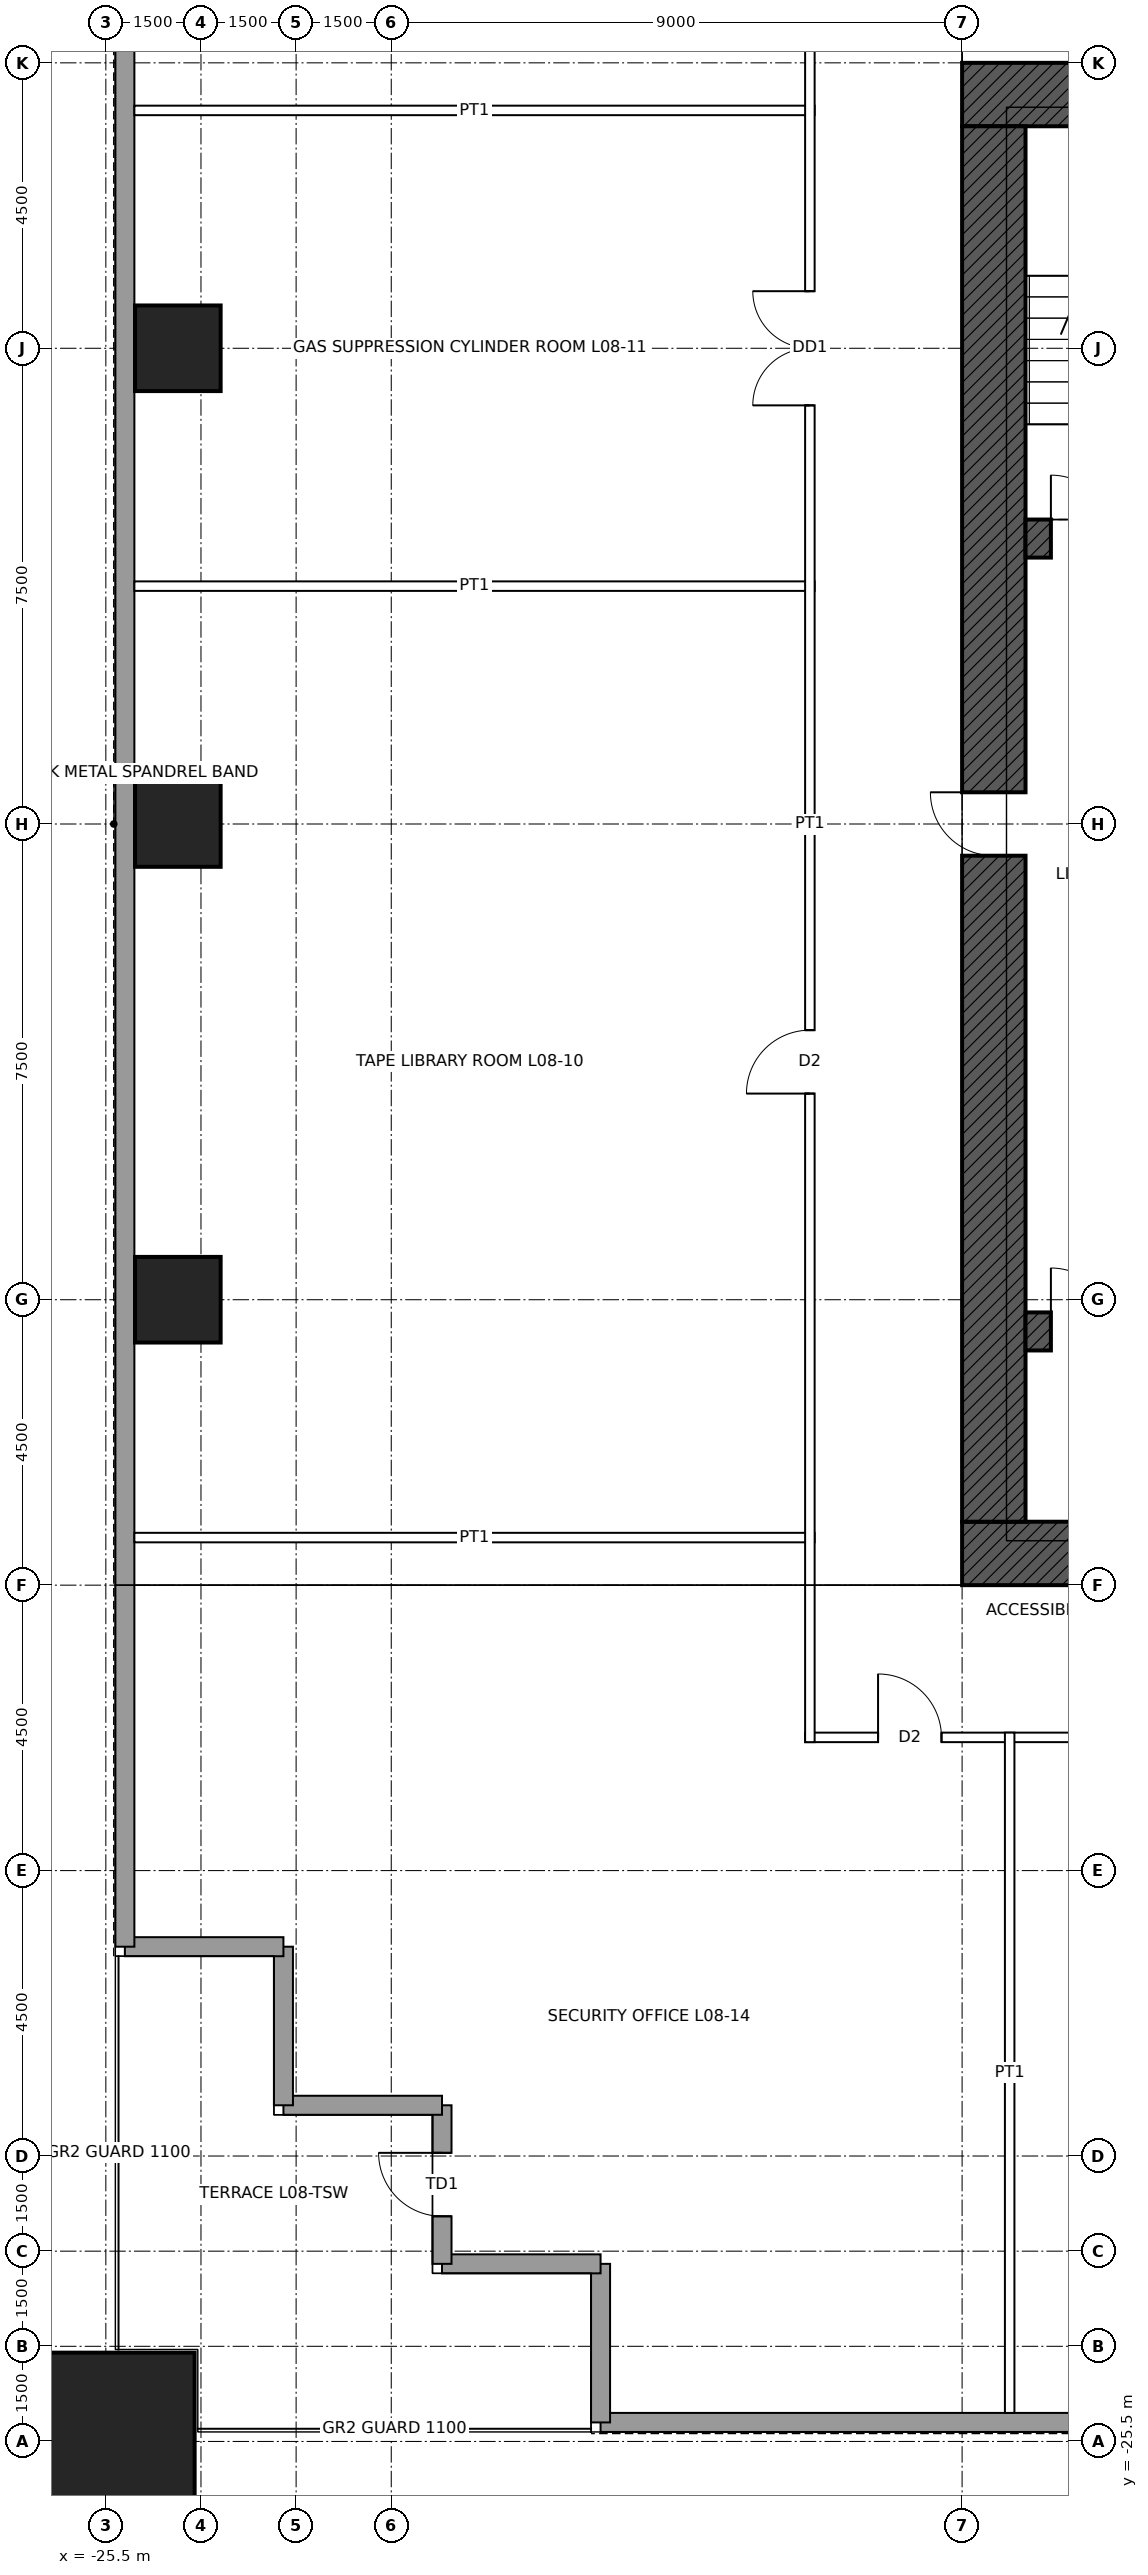
"""IFC4 building model, lengths in metres.
Left out: names, types, materials, properties, quantities, classifications, styles, units other than length and angle.
Written with IfcOpenShell. Run it as: python <this file> out.ifc"""

import sys

from ifc_helpers import new_model, si_unit, direction, frame, frame_2d, origin, origin_2d, place, context, subcontext, project, spatial, rectangle, hollow_rectangle, extrude, element, fill, save


model = new_model("IFC4")
c1 = context("Model", 3, precision=1e-05, world=origin(), true_north=direction((0.0, 1.0)))
c2 = subcontext(c1, "Body", "Model", "MODEL_VIEW")
j1 = project(units=[si_unit("LENGTHUNIT", "METRE"), si_unit("PLANEANGLEUNIT", "RADIAN")], contexts=[c1])
p1 = place(None, origin())
s1 = spatial("IfcSite", under=j1, at=p1, CompositionType="ELEMENT")
p2 = place(p1, origin())
s2 = spatial("IfcBuilding", under=s1, at=p2, CompositionType="ELEMENT")
p3 = place(p2, frame((0.0, 0.0, 43.4)))
s3 = spatial("IfcBuildingStorey", under=s2, at=p3, CompositionType="ELEMENT", Elevation=43.4)
p4 = place(p3, frame((-25.5, -25.5, 0.0), z_axis=(0.0, 0.0, 1.0), x_axis=(1.0, 0.0, 0.0)))
e1 = element("IfcColumn", 1, at=p4, inside=s3, PredefinedType="COLUMN", context=c2, shape_type="SweptSolid", body=[
    extrude(hollow_rectangle(XDim=2.8, YDim=2.8, WallThickness=0.14, at=origin_2d()), origin(), (0.0, 0.0, 1.0), 5.0),
])
for number, where, z_axis, x_axis in (
    (2, (-24.365, -7.5, 0.0), (0.0, 0.0, 1.0), (1.0, 0.0, 0.0)),
    (3, (-24.365, 0.0, 0.0), (0.0, 0.0, 1.0), (1.0, 0.0, 0.0)),
    (4, (-24.365, 7.5, 0.0), (0.0, 0.0, 1.0), (1.0, 0.0, 0.0)),
):
    element("IfcColumn", number, at=place(p3, frame(where, z_axis=z_axis, x_axis=x_axis)), inside=s3, PredefinedType="COLUMN", context=c2, shape_type="SweptSolid", body=[
        extrude(hollow_rectangle(XDim=1.35, YDim=1.35, WallThickness=0.085, at=origin_2d()), origin(), (0.0, 0.0, 1.0), 5.0),
    ])
p5 = place(p3, frame((-12.0, 11.5, 0.0), z_axis=(0.0, 0.0, 1.0), x_axis=(1.0, 0.0, 0.0)))
e5 = element("IfcWall", 5, at=p5, inside=s3, PredefinedType="SHEAR", context=c2, shape_type="SweptSolid", body=[
    extrude(rectangle(XDim=24.0, YDim=1.0, at=frame_2d((12.0, 0.0))), origin(), (0.0, 0.0, 1.0), 5.0),
])
p6 = place(p5, frame((6.25, 0.0, 0.0)))
e6 = element("IfcOpeningElement", 6, at=p6, cuts=e5, PredefinedType="OPENING", context=c2, shape_type="SweptSolid", body=[
    extrude(rectangle(XDim=1.0, YDim=2.4, at=frame_2d((0.5, 1.2))), frame((0.0, 0.51, 0.0), z_axis=(0.0, -1.0, 0.0), x_axis=(1.0, 0.0, 0.0)), (0.0, 0.0, 1.0), 1.02),
])
p7 = place(p5, frame((16.75, 0.0, 0.0)))
e7 = element("IfcOpeningElement", 7, at=p7, cuts=e5, PredefinedType="OPENING", context=c2, shape_type="SweptSolid", body=[
    extrude(rectangle(XDim=1.0, YDim=2.4, at=frame_2d((0.5, 1.2))), frame((0.0, 0.51, 0.0), z_axis=(0.0, -1.0, 0.0), x_axis=(1.0, 0.0, 0.0)), (0.0, 0.0, 1.0), 1.02),
])
p8 = place(p3, frame((12.0, -11.5, 0.0), z_axis=(0.0, 0.0, 1.0), x_axis=(-1.0, 0.0, 0.0)))
e8 = element("IfcWall", 8, at=p8, inside=s3, PredefinedType="SHEAR", context=c2, shape_type="SweptSolid", body=[
    extrude(rectangle(XDim=24.0, YDim=1.0, at=frame_2d((12.0, 0.0))), origin(), (0.0, 0.0, 1.0), 5.0),
])
p9 = place(p8, frame((11.5, 0.0, 0.0)))
e9 = element("IfcOpeningElement", 9, at=p9, cuts=e8, PredefinedType="OPENING", context=c2, shape_type="SweptSolid", body=[
    extrude(rectangle(XDim=1.0, YDim=2.1, at=frame_2d((0.5, 1.05))), frame((0.0, 0.51, 0.0), z_axis=(0.0, -1.0, 0.0), x_axis=(1.0, 0.0, 0.0)), (0.0, 0.0, 1.0), 1.02),
])
p10 = place(p8, frame((1.0, 0.0, 0.0)))
e10 = element("IfcOpeningElement", 10, at=p10, cuts=e8, PredefinedType="OPENING", context=c2, shape_type="SweptSolid", body=[
    extrude(rectangle(XDim=1.0, YDim=2.4, at=frame_2d((0.5, 1.2))), frame((0.0, 0.51, 0.0), z_axis=(0.0, -1.0, 0.0), x_axis=(1.0, 0.0, 0.0)), (0.0, 0.0, 1.0), 1.02),
])
p11 = place(p3, frame((-11.5, -11.0, 0.0), z_axis=(0.0, 0.0, 1.0), x_axis=(0.0, 1.0, 0.0)))
e11 = element("IfcWall", 11, at=p11, inside=s3, PredefinedType="SHEAR", context=c2, shape_type="SweptSolid", body=[
    extrude(rectangle(XDim=22.0, YDim=1.0, at=frame_2d((11.0, 0.0))), origin(), (0.0, 0.0, 1.0), 5.0),
])
p12 = place(p11, frame((10.5, 0.0, 0.0)))
e12 = element("IfcOpeningElement", 12, at=p12, cuts=e11, PredefinedType="OPENING", context=c2, shape_type="SweptSolid", body=[
    extrude(rectangle(XDim=1.0, YDim=2.4, at=frame_2d((0.5, 1.2))), frame((0.0, 0.51, 0.0), z_axis=(0.0, -1.0, 0.0), x_axis=(1.0, 0.0, 0.0)), (0.0, 0.0, 1.0), 1.02),
])
p13 = place(p3, frame((-11.0, 4.5, 0.0), z_axis=(0.0, 0.0, 1.0), x_axis=(1.0, 0.0, 0.0)))
e13 = element("IfcWall", 13, at=p13, inside=s3, PredefinedType="SHEAR", context=c2, shape_type="SweptSolid", body=[
    extrude(rectangle(XDim=22.0, YDim=0.6, at=frame_2d((11.0, 0.0))), origin(), (0.0, 0.0, 1.0), 5.0),
])
p14 = place(p13, frame((0.4, 0.0, 0.0)))
e14 = element("IfcOpeningElement", 14, at=p14, cuts=e13, PredefinedType="OPENING", context=c2, shape_type="SweptSolid", body=[
    extrude(rectangle(XDim=1.0, YDim=2.1, at=frame_2d((0.5, 1.05))), frame((0.0, 0.31, 0.0), z_axis=(0.0, -1.0, 0.0), x_axis=(1.0, 0.0, 0.0)), (0.0, 0.0, 1.0), 0.62),
])
p15 = place(p13, frame((20.6, 0.0, 0.0)))
e15 = element("IfcOpeningElement", 15, at=p15, cuts=e13, PredefinedType="OPENING", context=c2, shape_type="SweptSolid", body=[
    extrude(rectangle(XDim=1.0, YDim=2.1, at=frame_2d((0.5, 1.05))), frame((0.0, 0.31, 0.0), z_axis=(0.0, -1.0, 0.0), x_axis=(1.0, 0.0, 0.0)), (0.0, 0.0, 1.0), 0.62),
])
p16 = place(p3, frame((-11.0, -8.0, 0.0), z_axis=(0.0, 0.0, 1.0), x_axis=(1.0, 0.0, 0.0)))
e16 = element("IfcWall", 16, at=p16, inside=s3, PredefinedType="SHEAR", context=c2, shape_type="SweptSolid", body=[
    extrude(rectangle(XDim=2.0, YDim=0.6, at=frame_2d((1.0, 0.0))), origin(), (0.0, 0.0, 1.0), 5.0),
])
p17 = place(p16, frame((0.4, 0.0, 0.0)))
e17 = element("IfcOpeningElement", 17, at=p17, cuts=e16, PredefinedType="OPENING", context=c2, shape_type="SweptSolid", body=[
    extrude(rectangle(XDim=1.0, YDim=2.1, at=frame_2d((0.5, 1.05))), frame((0.0, 0.31, 0.0), z_axis=(0.0, -1.0, 0.0), x_axis=(1.0, 0.0, 0.0)), (0.0, 0.0, 1.0), 0.62),
])
p18 = place(p3, frame((17.7, -25.2, 0.0), z_axis=(0.0, 0.0, 1.0), x_axis=(-1.0, 0.0, 0.0)))
e18 = element("IfcWall", 18, at=p18, inside=s3, PredefinedType="SOLIDWALL", context=c2, shape_type="SweptSolid", body=[
    extrude(rectangle(XDim=35.4, YDim=0.3, at=frame_2d((17.7, 0.0))), origin(), (0.0, 0.0, 1.0), 4.8),
])
for number, where, z_axis, x_axis in (
    (19, (-17.7, -25.2, 0.0), (0.0, 0.0, 1.0), (0.0, 1.0, 0.0)),
    (20, (-17.7, -22.7, 0.0), (0.0, 0.0, 1.0), (-1.0, 0.0, 0.0)),
):
    element("IfcWall", number, at=place(p3, frame(where, z_axis=z_axis, x_axis=x_axis)), inside=s3, PredefinedType="SOLIDWALL", context=c2, shape_type="SweptSolid", body=[
        extrude(rectangle(XDim=2.5, YDim=0.3, at=frame_2d((1.25, 0.0))), origin(), (0.0, 0.0, 1.0), 4.8),
    ])
p19 = place(p3, frame((-20.2, -22.7, 0.0), z_axis=(0.0, 0.0, 1.0), x_axis=(0.0, 1.0, 0.0)))
e21 = element("IfcWall", 21, at=p19, inside=s3, PredefinedType="SOLIDWALL", context=c2, shape_type="SweptSolid", body=[
    extrude(rectangle(XDim=2.5, YDim=0.3, at=frame_2d((1.25, 0.0))), origin(), (0.0, 0.0, 1.0), 4.8),
])
p20 = place(p19, frame((0.75, 0.0, 0.0)))
e22 = element("IfcOpeningElement", 22, at=p20, cuts=e21, PredefinedType="OPENING", context=c2, shape_type="SweptSolid", body=[
    extrude(rectangle(XDim=1.0, YDim=2.4, at=frame_2d((0.5, 1.2))), frame((0.0, 0.16, 0.0), z_axis=(0.0, -1.0, 0.0), x_axis=(1.0, 0.0, 0.0)), (0.0, 0.0, 1.0), 0.32),
])
for number, where, z_axis, x_axis in (
    (23, (-20.2, -20.2, 0.0), (0.0, 0.0, 1.0), (-1.0, 0.0, 0.0)),
    (24, (-22.7, -20.2, 0.0), (0.0, 0.0, 1.0), (0.0, 1.0, 0.0)),
    (25, (-22.7, -17.7, 0.0), (0.0, 0.0, 1.0), (-1.0, 0.0, 0.0)),
):
    element("IfcWall", number, at=place(p3, frame(where, z_axis=z_axis, x_axis=x_axis)), inside=s3, PredefinedType="SOLIDWALL", context=c2, shape_type="SweptSolid", body=[
        extrude(rectangle(XDim=2.5, YDim=0.3, at=frame_2d((1.25, 0.0))), origin(), (0.0, 0.0, 1.0), 4.8),
    ])
p21 = place(p3, frame((-25.2, -17.7, 0.0), z_axis=(0.0, 0.0, 1.0), x_axis=(0.0, 1.0, 0.0)))
e26 = element("IfcWall", 26, at=p21, inside=s3, PredefinedType="SOLIDWALL", context=c2, shape_type="SweptSolid", body=[
    extrude(rectangle(XDim=35.4, YDim=0.3, at=frame_2d((17.7, 0.0))), origin(), (0.0, 0.0, 1.0), 4.8),
])
p22 = place(p3, frame((-14.475, -14.4, 0.0), z_axis=(0.0, 0.0, 1.0), x_axis=(1.0, 0.0, 0.0)))
e27 = element("IfcWall", 27, at=p22, inside=s3, PredefinedType="PARTITIONING", context=c2, shape_type="SweptSolid", body=[
    extrude(rectangle(XDim=28.95, YDim=0.15, at=frame_2d((14.475, 0.0))), origin(), (0.0, 0.0, 1.0), 4.8),
])
p23 = place(p22, frame((21.075, 0.0, 0.0)))
e28 = element("IfcOpeningElement", 28, at=p23, cuts=e27, PredefinedType="OPENING", context=c2, shape_type="SweptSolid", body=[
    extrude(rectangle(XDim=1.8, YDim=2.4, at=frame_2d((0.9, 1.2))), frame((0.0, 0.085, 0.0), z_axis=(0.0, -1.0, 0.0), x_axis=(1.0, 0.0, 0.0)), (0.0, 0.0, 1.0), 0.17),
])
p24 = place(p22, frame((10.225, 0.0, 0.0)))
e29 = element("IfcOpeningElement", 29, at=p24, cuts=e27, PredefinedType="OPENING", context=c2, shape_type="SweptSolid", body=[
    extrude(rectangle(XDim=1.0, YDim=2.1, at=frame_2d((0.5, 1.05))), frame((0.0, 0.085, 0.0), z_axis=(0.0, -1.0, 0.0), x_axis=(1.0, 0.0, 0.0)), (0.0, 0.0, 1.0), 0.17),
])
p25 = place(p22, frame((26.8, 0.0, 0.0)))
e30 = element("IfcOpeningElement", 30, at=p25, cuts=e27, PredefinedType="OPENING", context=c2, shape_type="SweptSolid", body=[
    extrude(rectangle(XDim=1.0, YDim=2.1, at=frame_2d((0.5, 1.05))), frame((0.0, 0.085, 0.0), z_axis=(0.0, -1.0, 0.0), x_axis=(1.0, 0.0, 0.0)), (0.0, 0.0, 1.0), 0.17),
])
p26 = place(p22, frame((1.15, 0.0, 0.0)))
e31 = element("IfcOpeningElement", 31, at=p26, cuts=e27, PredefinedType="OPENING", context=c2, shape_type="SweptSolid", body=[
    extrude(rectangle(XDim=1.0, YDim=2.1, at=frame_2d((0.5, 1.05))), frame((0.0, 0.085, 0.0), z_axis=(0.0, -1.0, 0.0), x_axis=(1.0, 0.0, 0.0)), (0.0, 0.0, 1.0), 0.17),
])
for number, where, z_axis, x_axis in (
    (32, (-25.05, -11.25, 0.0), (0.0, 0.0, 1.0), (1.0, 0.0, 0.0)),
    (33, (-25.05, 3.75, 0.0), (0.0, 0.0, 1.0), (1.0, 0.0, 0.0)),
    (34, (-25.05, 11.25, 0.0), (0.0, 0.0, 1.0), (1.0, 0.0, 0.0)),
):
    element("IfcWall", number, at=place(p3, frame(where, z_axis=z_axis, x_axis=x_axis)), inside=s3, PredefinedType="PARTITIONING", context=c2, shape_type="SweptSolid", body=[
        extrude(rectangle(XDim=10.725, YDim=0.15, at=frame_2d((5.363, 0.0))), origin(), (0.0, 0.0, 1.0), 3.853),
    ])
p27 = place(p3, frame((-14.4, -14.475, 0.0), z_axis=(0.0, 0.0, 1.0), x_axis=(0.0, 1.0, 0.0)))
e35 = element("IfcWall", 35, at=p27, inside=s3, PredefinedType="PARTITIONING", context=c2, shape_type="SweptSolid", body=[
    extrude(rectangle(XDim=28.95, YDim=0.15, at=frame_2d((14.475, 0.0))), origin(), (0.0, 0.0, 1.0), 4.8),
])
p28 = place(p27, frame((10.225, 0.0, 0.0)))
e36 = element("IfcOpeningElement", 36, at=p28, cuts=e35, PredefinedType="OPENING", context=c2, shape_type="SweptSolid", body=[
    extrude(rectangle(XDim=1.0, YDim=2.1, at=frame_2d((0.5, 1.05))), frame((0.0, 0.085, 0.0), z_axis=(0.0, -1.0, 0.0), x_axis=(1.0, 0.0, 0.0)), (0.0, 0.0, 1.0), 0.17),
])
p29 = place(p27, frame((21.075, 0.0, 0.0)))
e37 = element("IfcOpeningElement", 37, at=p29, cuts=e35, PredefinedType="OPENING", context=c2, shape_type="SweptSolid", body=[
    extrude(rectangle(XDim=1.8, YDim=2.4, at=frame_2d((0.9, 1.2))), frame((0.0, 0.085, 0.0), z_axis=(0.0, -1.0, 0.0), x_axis=(1.0, 0.0, 0.0)), (0.0, 0.0, 1.0), 0.17),
])
p30 = place(p3, frame((-11.25, -25.05, 0.0), z_axis=(0.0, 0.0, 1.0), x_axis=(0.0, 1.0, 0.0)))
e38 = element("IfcWall", 38, at=p30, inside=s3, PredefinedType="PARTITIONING", context=c2, shape_type="SweptSolid", body=[
    extrude(rectangle(XDim=10.725, YDim=0.15, at=frame_2d((5.363, 0.0))), origin(), (0.0, 0.0, 1.0), 3.853),
])
p31 = place(p20, origin())
e39 = element("IfcDoor", 39, at=p31, inside=s3, OperationType="SINGLE_SWING_RIGHT", PredefinedType="DOOR", context=c2, shape_type="SweptSolid", body=[
    extrude(rectangle(XDim=1.0, YDim=2.4, at=frame_2d((0.5, 1.2))), frame((0.0, 0.025, 0.0), z_axis=(0.0, -1.0, 0.0), x_axis=(1.0, 0.0, 0.0)), (0.0, 0.0, 1.0), 0.05),
])
fill(e22, e39)
p32 = place(p14, origin())
e40 = element("IfcDoor", 40, at=p32, inside=s3, OperationType="SINGLE_SWING_LEFT", PredefinedType="DOOR", context=c2, shape_type="SweptSolid", body=[
    extrude(rectangle(XDim=1.0, YDim=2.1, at=frame_2d((0.5, 1.05))), frame((0.0, 0.025, 0.0), z_axis=(0.0, -1.0, 0.0), x_axis=(1.0, 0.0, 0.0)), (0.0, 0.0, 1.0), 0.05),
])
fill(e14, e40)
p33 = place(p12, origin())
e41 = element("IfcDoor", 41, at=p33, inside=s3, OperationType="SINGLE_SWING_RIGHT", PredefinedType="DOOR", context=c2, shape_type="SweptSolid", body=[
    extrude(rectangle(XDim=1.0, YDim=2.4, at=frame_2d((0.5, 1.2))), frame((0.0, 0.485, 0.0), z_axis=(0.0, -1.0, 0.0), x_axis=(1.0, 0.0, 0.0)), (0.0, 0.0, 1.0), 0.05),
])
fill(e12, e41)
p34 = place(p17, origin())
e42 = element("IfcDoor", 42, at=p34, inside=s3, OperationType="SINGLE_SWING_LEFT", PredefinedType="DOOR", context=c2, shape_type="SweptSolid", body=[
    extrude(rectangle(XDim=1.0, YDim=2.1, at=frame_2d((0.5, 1.05))), frame((0.0, 0.025, 0.0), z_axis=(0.0, -1.0, 0.0), x_axis=(1.0, 0.0, 0.0)), (0.0, 0.0, 1.0), 0.05),
])
fill(e17, e42)
p35 = place(p28, origin())
e43 = element("IfcDoor", 43, at=p35, inside=s3, OperationType="SINGLE_SWING_LEFT", PredefinedType="DOOR", context=c2, shape_type="SweptSolid", body=[
    extrude(rectangle(XDim=1.0, YDim=2.1, at=frame_2d((0.5, 1.05))), frame((0.0, 0.025, 0.0), z_axis=(0.0, -1.0, 0.0), x_axis=(1.0, 0.0, 0.0)), (0.0, 0.0, 1.0), 0.05),
])
fill(e36, e43)
p36 = place(p29, origin())
e44 = element("IfcDoor", 44, at=p36, inside=s3, OperationType="DOUBLE_DOOR_SINGLE_SWING", PredefinedType="DOOR", context=c2, shape_type="SweptSolid", body=[
    extrude(rectangle(XDim=1.8, YDim=2.4, at=frame_2d((0.9, 1.2))), frame((0.0, 0.025, 0.0), z_axis=(0.0, -1.0, 0.0), x_axis=(1.0, 0.0, 0.0)), (0.0, 0.0, 1.0), 0.05),
])
fill(e37, e44)
p37 = place(p26, origin())
e45 = element("IfcDoor", 45, at=p37, inside=s3, OperationType="SINGLE_SWING_LEFT", PredefinedType="DOOR", context=c2, shape_type="SweptSolid", body=[
    extrude(rectangle(XDim=1.0, YDim=2.1, at=frame_2d((0.5, 1.05))), frame((0.0, 0.025, 0.0), z_axis=(0.0, -1.0, 0.0), x_axis=(1.0, 0.0, 0.0)), (0.0, 0.0, 1.0), 0.05),
])
fill(e31, e45)
save(model, sys.argv[1])
